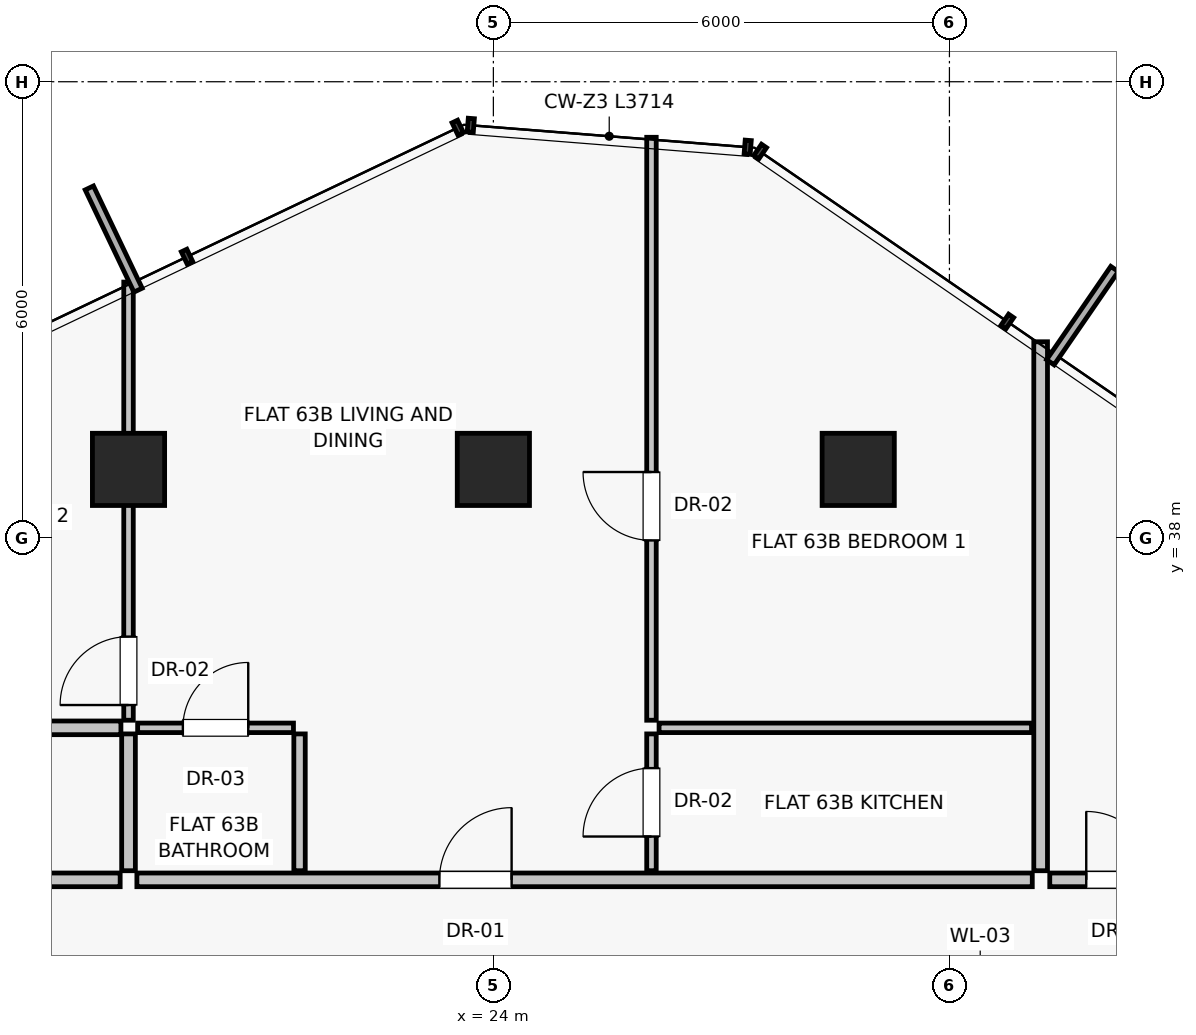
"""IFC4 building model, lengths in metres.
Left out: names, types, materials, properties, quantities, classifications, styles, units other than length and angle.
Written with IfcOpenShell. Run it as: python <this file> out.ifc"""

import sys

from ifc_helpers import new_model, si_unit, direction, frame, frame_2d, origin, origin_2d, place, context, subcontext, project, spatial, rectangle, extrude, source, transform, mapped, element, fill, save


model = new_model("IFC4")
c1 = context("Model", 3, precision=1e-05, world=origin(), true_north=direction((0.0, 1.0)))
c2 = subcontext(c1, "Body", "Model", "MODEL_VIEW")
j1 = project(units=[si_unit("LENGTHUNIT", "METRE"), si_unit("PLANEANGLEUNIT", "RADIAN")], contexts=[c1])
p1 = place(None, origin())
s1 = spatial("IfcSite", under=j1, at=p1, CompositionType="ELEMENT")
p2 = place(p1, origin())
s2 = spatial("IfcBuilding", under=s1, at=p2, CompositionType="ELEMENT")
p3 = place(p2, frame((0.0, 0.0, 222.15)))
s3 = spatial("IfcBuildingStorey", under=s2, at=p3, CompositionType="ELEMENT", Elevation=222.15)
for number, where, z_axis, x_axis in (
    (1, (28.8, 38.9, 0.0), (0.0, 0.0, 1.0), (1.0, 0.0, 0.0)),
    (2, (24.0, 38.9, 0.0), (0.0, 0.0, 1.0), (1.0, 0.0, 0.0)),
    (3, (19.2, 38.9, 0.0), (0.0, 0.0, 1.0), (1.0, 0.0, 0.0)),
):
    element("IfcColumn", number, at=place(p3, frame(where, z_axis=z_axis, x_axis=x_axis)), inside=s3, PredefinedType="COLUMN", context=c2, shape_type="SweptSolid", body=[
        extrude(rectangle(XDim=0.95, YDim=0.95, at=origin_2d()), origin(), (0.0, 0.0, 1.0), 3.25),
    ])
p4 = place(p3, frame((31.2, 33.62, 0.0), z_axis=(0.0, 0.0, 1.0), x_axis=(0.0, 1.0, 0.0)))
e4 = element("IfcWall", 4, at=p4, inside=s3, PredefinedType="PARTITIONING", context=c2, shape_type="SweptSolid", body=[
    extrude(rectangle(XDim=6.959, YDim=0.18, at=frame_2d((3.479, 0.0))), origin(), (0.0, 0.0, 1.0), 2.93),
])
p5 = place(p3, frame((15.31, 33.5, 0.0), z_axis=(0.0, 0.0, 1.0), x_axis=(1.0, 0.0, 0.0)))
e5 = element("IfcWall", 5, at=p5, inside=s3, PredefinedType="PARTITIONING", context=c2, shape_type="SweptSolid", body=[
    extrude(rectangle(XDim=3.78, YDim=0.18, at=frame_2d((1.89, 0.0))), origin(), (0.0, 0.0, 1.0), 2.93),
])
p6 = place(p5, frame((1.39, 0.0, 0.0)))
e6 = element("IfcOpeningElement", 6, at=p6, cuts=e5, PredefinedType="OPENING", context=c2, shape_type="SweptSolid", body=[
    extrude(rectangle(XDim=1.0, YDim=2.01, at=frame_2d((0.5, 1.005))), frame((0.0, 0.1, 0.0), z_axis=(0.0, -1.0, 0.0), x_axis=(1.0, 0.0, 0.0)), (0.0, 0.0, 1.0), 0.2),
])
p7 = place(p3, frame((19.31, 33.5, 0.0), z_axis=(0.0, 0.0, 1.0), x_axis=(1.0, 0.0, 0.0)))
e7 = element("IfcWall", 7, at=p7, inside=s3, PredefinedType="PARTITIONING", context=c2, shape_type="SweptSolid", body=[
    extrude(rectangle(XDim=11.78, YDim=0.18, at=frame_2d((5.89, 0.0))), origin(), (0.0, 0.0, 1.0), 2.93),
])
p8 = place(p7, frame((3.98, 0.0, 0.0)))
e8 = element("IfcOpeningElement", 8, at=p8, cuts=e7, PredefinedType="OPENING", context=c2, shape_type="SweptSolid", body=[
    extrude(rectangle(XDim=0.95, YDim=2.02, at=frame_2d((0.475, 1.01))), frame((0.0, 0.1, 0.0), z_axis=(0.0, -1.0, 0.0), x_axis=(1.0, 0.0, 0.0)), (0.0, 0.0, 1.0), 0.2),
])
p9 = place(p3, frame((15.32, 35.5, 0.0), z_axis=(0.0, 0.0, 1.0), x_axis=(1.0, 0.0, 0.0)))
e9 = element("IfcWall", 9, at=p9, inside=s3, PredefinedType="PARTITIONING", context=c2, shape_type="SweptSolid", body=[
    extrude(rectangle(XDim=3.78, YDim=0.18, at=frame_2d((1.89, 0.0))), origin(), (0.0, 0.0, 1.0), 2.93),
])
p10 = place(p3, frame((19.2, 33.62, 0.0), z_axis=(0.0, 0.0, 1.0), x_axis=(0.0, 1.0, 0.0)))
e10 = element("IfcWall", 10, at=p10, inside=s3, PredefinedType="PARTITIONING", context=c2, shape_type="SweptSolid", body=[
    extrude(rectangle(XDim=1.8, YDim=0.18, at=frame_2d((0.9, 0.0))), origin(), (0.0, 0.0, 1.0), 2.93),
])
p11 = place(p3, frame((19.2, 35.6, 0.0), z_axis=(0.0, 0.0, 1.0), x_axis=(0.0, 1.0, 0.0)))
e11 = element("IfcWall", 11, at=p11, inside=s3, PredefinedType="PARTITIONING", context=c2, shape_type="SweptSolid", body=[
    extrude(rectangle(XDim=5.764, YDim=0.125, at=frame_2d((2.882, 0.0))), origin(), (0.0, 0.0, 1.0), 2.384),
])
p12 = place(p11, frame((0.2, 0.0, 0.0)))
e12 = element("IfcOpeningElement", 12, at=p12, cuts=e11, PredefinedType="OPENING", context=c2, shape_type="SweptSolid", body=[
    extrude(rectangle(XDim=0.9, YDim=2.01, at=frame_2d((0.45, 1.005))), frame((0.0, 0.073, 0.0), z_axis=(0.0, -1.0, 0.0), x_axis=(1.0, 0.0, 0.0)), (0.0, 0.0, 1.0), 0.145),
])
p13 = place(p3, frame((21.45, 33.62, 0.0), z_axis=(0.0, 0.0, 1.0), x_axis=(0.0, 1.0, 0.0)))
e13 = element("IfcWall", 13, at=p13, inside=s3, PredefinedType="PARTITIONING", context=c2, shape_type="SweptSolid", body=[
    extrude(rectangle(XDim=1.8, YDim=0.15, at=frame_2d((0.9, 0.0))), origin(), (0.0, 0.0, 1.0), 2.93),
])
p14 = place(p3, frame((19.32, 35.5, 0.0), z_axis=(0.0, 0.0, 1.0), x_axis=(1.0, 0.0, 0.0)))
e14 = element("IfcWall", 14, at=p14, inside=s3, PredefinedType="PARTITIONING", context=c2, shape_type="SweptSolid", body=[
    extrude(rectangle(XDim=2.05, YDim=0.125, at=frame_2d((1.025, 0.0))), origin(), (0.0, 0.0, 1.0), 2.577),
])
p15 = place(p14, frame((0.595, 0.0, 0.0)))
e15 = element("IfcOpeningElement", 15, at=p15, cuts=e14, PredefinedType="OPENING", context=c2, shape_type="SweptSolid", body=[
    extrude(rectangle(XDim=0.86, YDim=2.01, at=frame_2d((0.43, 1.005))), frame((0.0, 0.073, 0.0), z_axis=(0.0, -1.0, 0.0), x_axis=(1.0, 0.0, 0.0)), (0.0, 0.0, 1.0), 0.145),
])
p16 = place(p3, frame((26.08, 33.62, 0.0), z_axis=(0.0, 0.0, 1.0), x_axis=(0.0, 1.0, 0.0)))
e16 = element("IfcWall", 16, at=p16, inside=s3, PredefinedType="PARTITIONING", context=c2, shape_type="SweptSolid", body=[
    extrude(rectangle(XDim=1.8, YDim=0.125, at=frame_2d((0.9, 0.0))), origin(), (0.0, 0.0, 1.0), 2.93),
])
p17 = place(p16, frame((0.45, 0.0, 0.0)))
e17 = element("IfcOpeningElement", 17, at=p17, cuts=e16, PredefinedType="OPENING", context=c2, shape_type="SweptSolid", body=[
    extrude(rectangle(XDim=0.9, YDim=2.01, at=frame_2d((0.45, 1.005))), frame((0.0, 0.073, 0.0), z_axis=(0.0, -1.0, 0.0), x_axis=(1.0, 0.0, 0.0)), (0.0, 0.0, 1.0), 0.145),
])
p18 = place(p3, frame((26.18, 35.5, 0.0), z_axis=(0.0, 0.0, 1.0), x_axis=(1.0, 0.0, 0.0)))
e18 = element("IfcWall", 18, at=p18, inside=s3, PredefinedType="PARTITIONING", context=c2, shape_type="SweptSolid", body=[
    extrude(rectangle(XDim=4.9, YDim=0.125, at=frame_2d((2.45, 0.0))), origin(), (0.0, 0.0, 1.0), 2.577),
])
p19 = place(p3, frame((26.08, 35.6, 0.0), z_axis=(0.0, 0.0, 1.0), x_axis=(0.0, 1.0, 0.0)))
e19 = element("IfcWall", 19, at=p19, inside=s3, PredefinedType="PARTITIONING", context=c2, shape_type="SweptSolid", body=[
    extrude(rectangle(XDim=7.669, YDim=0.125, at=frame_2d((3.834, 0.0))), origin(), (0.0, 0.0, 1.0), 2.93),
])
p20 = place(p19, frame((2.365, 0.0, 0.0)))
e20 = element("IfcOpeningElement", 20, at=p20, cuts=e19, PredefinedType="OPENING", context=c2, shape_type="SweptSolid", body=[
    extrude(rectangle(XDim=0.9, YDim=2.01, at=frame_2d((0.45, 1.005))), frame((0.0, 0.073, 0.0), z_axis=(0.0, -1.0, 0.0), x_axis=(1.0, 0.0, 0.0)), (0.0, 0.0, 1.0), 0.145),
])
p21 = place(p3, frame((31.32, 33.5, 0.0), z_axis=(0.0, 0.0, 1.0), x_axis=(1.0, 0.0, 0.0)))
e21 = element("IfcWall", 21, at=p21, inside=s3, PredefinedType="PARTITIONING", context=c2, shape_type="SweptSolid", body=[
    extrude(rectangle(XDim=1.86, YDim=0.18, at=frame_2d((0.93, 0.0))), origin(), (0.0, 0.0, 1.0), 2.93),
])
p22 = place(p21, frame((0.48, 0.0, 0.0)))
e22 = element("IfcOpeningElement", 22, at=p22, cuts=e21, PredefinedType="OPENING", context=c2, shape_type="SweptSolid", body=[
    extrude(rectangle(XDim=0.9, YDim=2.01, at=frame_2d((0.45, 1.005))), frame((0.0, 0.1, 0.0), z_axis=(0.0, -1.0, 0.0), x_axis=(1.0, 0.0, 0.0)), (0.0, 0.0, 1.0), 0.2),
])
m1 = source(origin(), c2, "Body", "SweptSolid", [
    extrude(rectangle(XDim=0.95, YDim=2.02, at=frame_2d((0.475, 1.01))), frame((0.0, 0.025, 0.0), z_axis=(0.0, -1.0, 0.0), x_axis=(1.0, 0.0, 0.0)), (0.0, 0.0, 1.0), 0.05),
])
p23 = place(p8, origin())
e23 = element("IfcDoor", 23, at=p23, inside=s3, OperationType="SINGLE_SWING_RIGHT", PredefinedType="DOOR", context=c2, shape_type="MappedRepresentation", body=[
    mapped(m1, transform((0.0, 0.0, 0.0), scale=1.0)),
])
fill(e8, e23)
m2 = source(origin(), c2, "Body", "SweptSolid", [
    extrude(rectangle(XDim=0.9, YDim=2.01, at=frame_2d((0.45, 1.005))), frame((0.0, 0.025, 0.0), z_axis=(0.0, -1.0, 0.0), x_axis=(1.0, 0.0, 0.0)), (0.0, 0.0, 1.0), 0.05),
])
p24 = place(p12, origin())
e24 = element("IfcDoor", 24, at=p24, inside=s3, OperationType="SINGLE_SWING_LEFT", PredefinedType="DOOR", context=c2, shape_type="MappedRepresentation", body=[
    mapped(m2, transform((0.0, 0.0, 0.0), scale=1.0)),
])
fill(e12, e24)
m3 = source(origin(), c2, "Body", "SweptSolid", [
    extrude(rectangle(XDim=0.86, YDim=2.01, at=frame_2d((0.43, 1.005))), frame((0.0, 0.025, 0.0), z_axis=(0.0, -1.0, 0.0), x_axis=(1.0, 0.0, 0.0)), (0.0, 0.0, 1.0), 0.05),
])
p25 = place(p15, origin())
e25 = element("IfcDoor", 25, at=p25, inside=s3, OperationType="SINGLE_SWING_RIGHT", PredefinedType="DOOR", context=c2, shape_type="MappedRepresentation", body=[
    mapped(m3, transform((0.0, 0.0, 0.0), scale=1.0)),
])
fill(e15, e25)
p26 = place(p17, origin())
e26 = element("IfcDoor", 26, at=p26, inside=s3, OperationType="SINGLE_SWING_LEFT", PredefinedType="DOOR", context=c2, shape_type="MappedRepresentation", body=[
    mapped(m2, transform((0.0, 0.0, 0.0), scale=1.0)),
])
fill(e17, e26)
p27 = place(p20, origin())
e27 = element("IfcDoor", 27, at=p27, inside=s3, OperationType="SINGLE_SWING_RIGHT", PredefinedType="DOOR", context=c2, shape_type="MappedRepresentation", body=[
    mapped(m2, transform((0.0, 0.0, 0.0), scale=1.0)),
])
fill(e20, e27)
p28 = place(p22, origin())
e28 = element("IfcDoor", 28, at=p28, inside=s3, OperationType="SINGLE_SWING_LEFT", PredefinedType="DOOR", context=c2, shape_type="MappedRepresentation", body=[
    mapped(m2, transform((0.0, 0.0, 0.0), scale=1.0)),
])
fill(e22, e28)
save(model, sys.argv[1])
